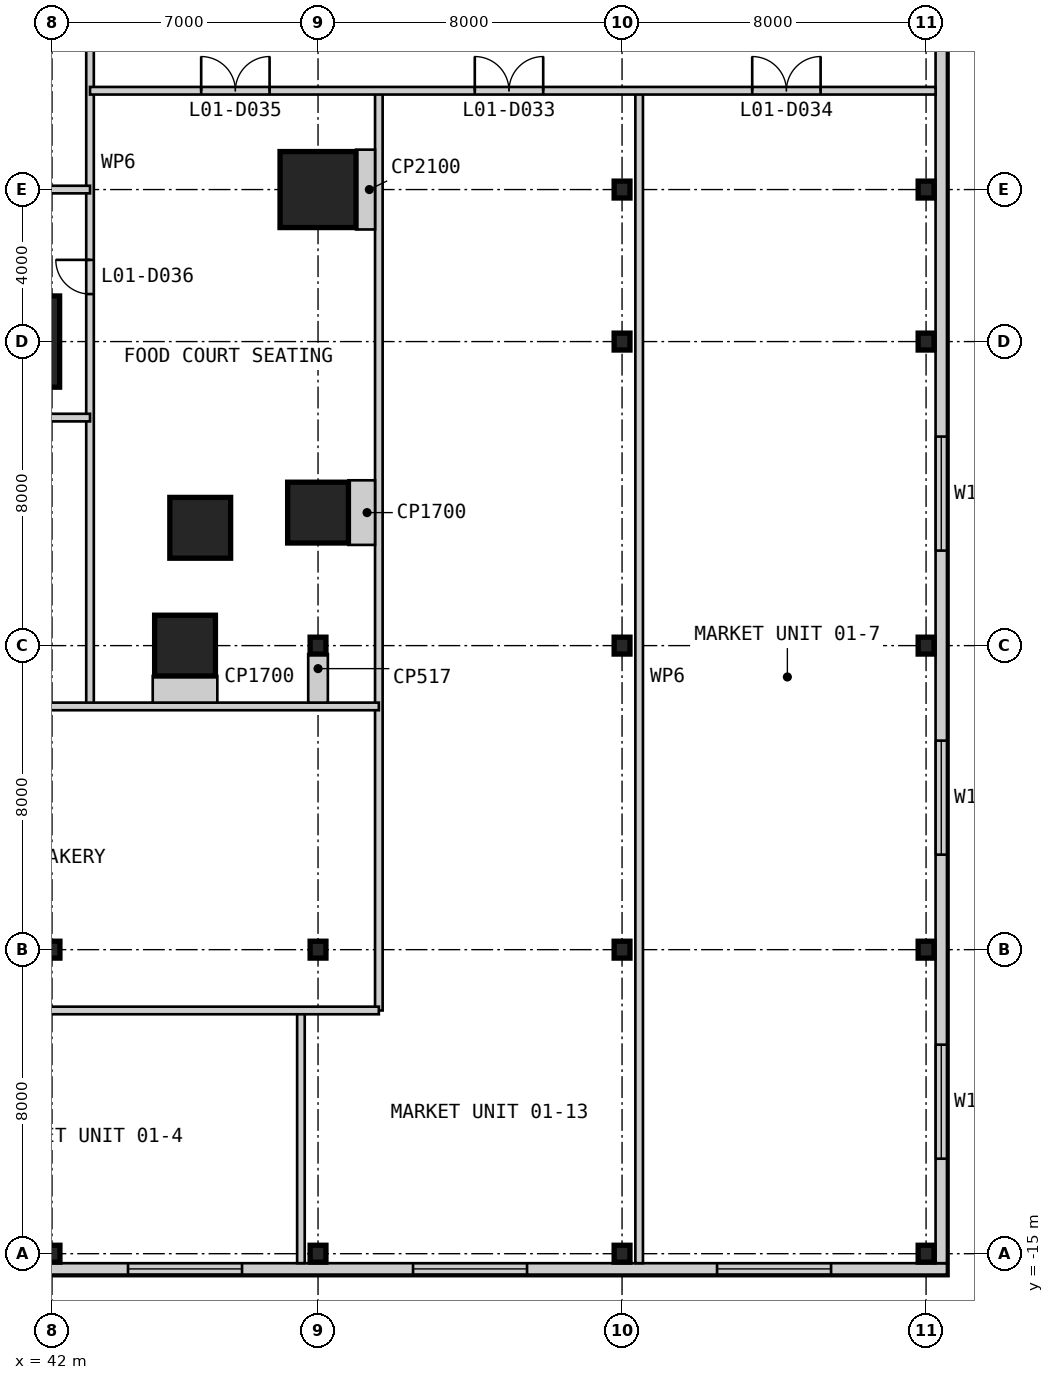
"""IFC4 building model, lengths in metres.
Left out: names, types, materials, properties, quantities, classifications, styles, units other than length and angle.
Written with IfcOpenShell. Run it as: python <this file> out.ifc"""

import sys

from ifc_helpers import new_model, si_unit, direction, frame, frame_2d, origin, origin_2d, place, context, subcontext, project, spatial, rectangle, i_section, extrude, element, fill, save


model = new_model("IFC4")
c1 = context("Model", 3, precision=1e-05, world=origin(), true_north=direction((0.0, 1.0)))
c2 = subcontext(c1, "Body", "Model", "MODEL_VIEW")
j1 = project(units=[si_unit("LENGTHUNIT", "METRE"), si_unit("PLANEANGLEUNIT", "RADIAN")], contexts=[c1])
p1 = place(None, origin())
s1 = spatial("IfcSite", under=j1, at=p1, CompositionType="ELEMENT")
p2 = place(p1, origin())
s2 = spatial("IfcBuilding", under=s1, at=p2, CompositionType="ELEMENT")
p3 = place(p2, frame((0.0, 0.0, 7.0)))
s3 = spatial("IfcBuildingStorey", under=s2, at=p3, CompositionType="ELEMENT", Elevation=7.0)
p4 = place(p3, frame((41.0, 9.0, 0.0), z_axis=(0.0, 0.0, 1.0), x_axis=(1.0, 0.0, 0.0)))
e1 = element("IfcColumn", 1, at=p4, inside=s3, PredefinedType="COLUMN", context=c2, shape_type="SweptSolid", body=[
    extrude(rectangle(XDim=2.4, YDim=2.4, at=origin_2d()), origin(), (0.0, 0.0, 1.0), 4.8),
])
for number, where, z_axis, x_axis in (
    (2, (45.5, 1.0, 0.0), (0.0, 0.0, 1.0), (1.0, 0.0, 0.0)),
    (3, (45.9, 4.1, 0.0), (0.0, 0.0, 1.0), (1.0, 0.0, 0.0)),
    (4, (49.0, 4.5, 0.0), (0.0, 0.0, 1.0), (1.0, 0.0, 0.0)),
):
    element("IfcColumn", number, at=place(p3, frame(where, z_axis=z_axis, x_axis=x_axis)), inside=s3, PredefinedType="COLUMN", context=c2, shape_type="SweptSolid", body=[
        extrude(rectangle(XDim=1.6, YDim=1.6, at=origin_2d()), origin(), (0.0, 0.0, 1.0), 4.8),
    ])
p5 = place(p3, frame((49.0, 13.0, 0.0), z_axis=(0.0, 0.0, 1.0), x_axis=(1.0, 0.0, 0.0)))
e5 = element("IfcColumn", 5, at=p5, inside=s3, PredefinedType="COLUMN", context=c2, shape_type="SweptSolid", body=[
    extrude(rectangle(XDim=2.0, YDim=2.0, at=origin_2d()), origin(), (0.0, 0.0, 1.0), 4.8),
])
for number, where, z_axis, x_axis in (
    (6, (42.0, -15.0, 0.0), (0.0, 0.0, 1.0), (1.0, 0.0, 0.0)),
    (7, (42.0, -7.0, 0.0), (0.0, 0.0, 1.0), (1.0, 0.0, 0.0)),
    (8, (49.0, -15.0, 0.0), (0.0, 0.0, 1.0), (1.0, 0.0, 0.0)),
    (9, (49.0, -7.0, 0.0), (0.0, 0.0, 1.0), (1.0, 0.0, 0.0)),
    (10, (49.0, 1.0, 0.0), (0.0, 0.0, 1.0), (1.0, 0.0, 0.0)),
    (11, (57.0, -15.0, 0.0), (0.0, 0.0, 1.0), (1.0, 0.0, 0.0)),
    (12, (57.0, -7.0, 0.0), (0.0, 0.0, 1.0), (1.0, 0.0, 0.0)),
    (13, (57.0, 1.0, 0.0), (0.0, 0.0, 1.0), (1.0, 0.0, 0.0)),
    (14, (57.0, 9.0, 0.0), (0.0, 0.0, 1.0), (1.0, 0.0, 0.0)),
    (15, (57.0, 13.0, 0.0), (0.0, 0.0, 1.0), (1.0, 0.0, 0.0)),
    (16, (65.0, -15.0, 0.0), (0.0, 0.0, 1.0), (1.0, 0.0, 0.0)),
    (17, (65.0, -7.0, 0.0), (0.0, 0.0, 1.0), (1.0, 0.0, 0.0)),
    (18, (65.0, 1.0, 0.0), (0.0, 0.0, 1.0), (1.0, 0.0, 0.0)),
    (19, (65.0, 9.0, 0.0), (0.0, 0.0, 1.0), (1.0, 0.0, 0.0)),
    (20, (65.0, 13.0, 0.0), (0.0, 0.0, 1.0), (1.0, 0.0, 0.0)),
):
    element("IfcColumn", number, at=place(p3, frame(where, z_axis=z_axis, x_axis=x_axis)), inside=s3, PredefinedType="COLUMN", context=c2, shape_type="SweptSolid", body=[
        extrude(i_section(OverallWidth=0.417, OverallDepth=0.445, WebThickness=0.039, FlangeThickness=0.063, at=origin_2d()), origin(), (0.0, 0.0, 1.0), 4.8),
    ])
p6 = place(p3, frame((-15.55, -15.4, 0.0), z_axis=(0.0, 0.0, 1.0), x_axis=(1.0, 0.0, 0.0)))
e21 = element("IfcWall", 21, at=p6, inside=s3, PredefinedType="SOLIDWALL", context=c2, shape_type="SweptSolid", body=[
    extrude(rectangle(XDim=81.1, YDim=0.3, at=frame_2d((40.55, 0.0))), origin(), (0.0, 0.0, 1.0), 4.5),
])
p7 = place(p6, frame((3.05, 0.0, 0.9)))
e22 = element("IfcOpeningElement", 22, at=p7, cuts=e21, PredefinedType="OPENING", context=c2, shape_type="SweptSolid", body=[
    extrude(rectangle(XDim=3.0, YDim=2.4, at=frame_2d((1.5, 1.2))), frame((0.0, 0.16, 0.0), z_axis=(0.0, -1.0, 0.0), x_axis=(1.0, 0.0, 0.0)), (0.0, 0.0, 1.0), 0.32),
])
p8 = place(p6, frame((11.05, 0.0, 0.9)))
e23 = element("IfcOpeningElement", 23, at=p8, cuts=e21, PredefinedType="OPENING", context=c2, shape_type="SweptSolid", body=[
    extrude(rectangle(XDim=3.0, YDim=2.4, at=frame_2d((1.5, 1.2))), frame((0.0, 0.16, 0.0), z_axis=(0.0, -1.0, 0.0), x_axis=(1.0, 0.0, 0.0)), (0.0, 0.0, 1.0), 0.32),
])
p9 = place(p6, frame((19.05, 0.0, 0.9)))
e24 = element("IfcOpeningElement", 24, at=p9, cuts=e21, PredefinedType="OPENING", context=c2, shape_type="SweptSolid", body=[
    extrude(rectangle(XDim=3.0, YDim=2.4, at=frame_2d((1.5, 1.2))), frame((0.0, 0.16, 0.0), z_axis=(0.0, -1.0, 0.0), x_axis=(1.0, 0.0, 0.0)), (0.0, 0.0, 1.0), 0.32),
])
p10 = place(p6, frame((33.05, 0.0, 0.9)))
e25 = element("IfcOpeningElement", 25, at=p10, cuts=e21, PredefinedType="OPENING", context=c2, shape_type="SweptSolid", body=[
    extrude(rectangle(XDim=3.0, YDim=2.4, at=frame_2d((1.5, 1.2))), frame((0.0, 0.16, 0.0), z_axis=(0.0, -1.0, 0.0), x_axis=(1.0, 0.0, 0.0)), (0.0, 0.0, 1.0), 0.32),
])
p11 = place(p6, frame((45.05, 0.0, 0.9)))
e26 = element("IfcOpeningElement", 26, at=p11, cuts=e21, PredefinedType="OPENING", context=c2, shape_type="SweptSolid", body=[
    extrude(rectangle(XDim=3.0, YDim=2.4, at=frame_2d((1.5, 1.2))), frame((0.0, 0.16, 0.0), z_axis=(0.0, -1.0, 0.0), x_axis=(1.0, 0.0, 0.0)), (0.0, 0.0, 1.0), 0.32),
])
p12 = place(p6, frame((53.55, 0.0, 0.9)))
e27 = element("IfcOpeningElement", 27, at=p12, cuts=e21, PredefinedType="OPENING", context=c2, shape_type="SweptSolid", body=[
    extrude(rectangle(XDim=3.0, YDim=2.4, at=frame_2d((1.5, 1.2))), frame((0.0, 0.16, 0.0), z_axis=(0.0, -1.0, 0.0), x_axis=(1.0, 0.0, 0.0)), (0.0, 0.0, 1.0), 0.32),
])
p13 = place(p6, frame((59.55, 0.0, 0.9)))
e28 = element("IfcOpeningElement", 28, at=p13, cuts=e21, PredefinedType="OPENING", context=c2, shape_type="SweptSolid", body=[
    extrude(rectangle(XDim=3.0, YDim=2.4, at=frame_2d((1.5, 1.2))), frame((0.0, 0.16, 0.0), z_axis=(0.0, -1.0, 0.0), x_axis=(1.0, 0.0, 0.0)), (0.0, 0.0, 1.0), 0.32),
])
p14 = place(p6, frame((67.05, 0.0, 0.9)))
e29 = element("IfcOpeningElement", 29, at=p14, cuts=e21, PredefinedType="OPENING", context=c2, shape_type="SweptSolid", body=[
    extrude(rectangle(XDim=3.0, YDim=2.4, at=frame_2d((1.5, 1.2))), frame((0.0, 0.16, 0.0), z_axis=(0.0, -1.0, 0.0), x_axis=(1.0, 0.0, 0.0)), (0.0, 0.0, 1.0), 0.32),
])
p15 = place(p6, frame((75.05, 0.0, 0.9)))
e30 = element("IfcOpeningElement", 30, at=p15, cuts=e21, PredefinedType="OPENING", context=c2, shape_type="SweptSolid", body=[
    extrude(rectangle(XDim=3.0, YDim=2.4, at=frame_2d((1.5, 1.2))), frame((0.0, 0.16, 0.0), z_axis=(0.0, -1.0, 0.0), x_axis=(1.0, 0.0, 0.0)), (0.0, 0.0, 1.0), 0.32),
])
p16 = place(p3, frame((65.4, -15.25, 0.0), z_axis=(0.0, 0.0, 1.0), x_axis=(0.0, 1.0, 0.0)))
e31 = element("IfcWall", 31, at=p16, inside=s3, PredefinedType="SOLIDWALL", context=c2, shape_type="SweptSolid", body=[
    extrude(rectangle(XDim=80.5, YDim=0.3, at=frame_2d((40.25, 0.0))), origin(), (0.0, 0.0, 1.0), 4.5),
])
p17 = place(p16, frame((2.75, 0.0, 0.9)))
e32 = element("IfcOpeningElement", 32, at=p17, cuts=e31, PredefinedType="OPENING", context=c2, shape_type="SweptSolid", body=[
    extrude(rectangle(XDim=3.0, YDim=2.4, at=frame_2d((1.5, 1.2))), frame((0.0, 0.16, 0.0), z_axis=(0.0, -1.0, 0.0), x_axis=(1.0, 0.0, 0.0)), (0.0, 0.0, 1.0), 0.32),
])
p18 = place(p16, frame((10.75, 0.0, 0.9)))
e33 = element("IfcOpeningElement", 33, at=p18, cuts=e31, PredefinedType="OPENING", context=c2, shape_type="SweptSolid", body=[
    extrude(rectangle(XDim=3.0, YDim=2.4, at=frame_2d((1.5, 1.2))), frame((0.0, 0.16, 0.0), z_axis=(0.0, -1.0, 0.0), x_axis=(1.0, 0.0, 0.0)), (0.0, 0.0, 1.0), 0.32),
])
p19 = place(p16, frame((18.75, 0.0, 0.9)))
e34 = element("IfcOpeningElement", 34, at=p19, cuts=e31, PredefinedType="OPENING", context=c2, shape_type="SweptSolid", body=[
    extrude(rectangle(XDim=3.0, YDim=2.4, at=frame_2d((1.5, 1.2))), frame((0.0, 0.16, 0.0), z_axis=(0.0, -1.0, 0.0), x_axis=(1.0, 0.0, 0.0)), (0.0, 0.0, 1.0), 0.32),
])
p20 = place(p16, frame((32.75, 0.0, 0.9)))
e35 = element("IfcOpeningElement", 35, at=p20, cuts=e31, PredefinedType="OPENING", context=c2, shape_type="SweptSolid", body=[
    extrude(rectangle(XDim=3.0, YDim=2.4, at=frame_2d((1.5, 1.2))), frame((0.0, 0.16, 0.0), z_axis=(0.0, -1.0, 0.0), x_axis=(1.0, 0.0, 0.0)), (0.0, 0.0, 1.0), 0.32),
])
p21 = place(p16, frame((44.75, 0.0, 0.9)))
e36 = element("IfcOpeningElement", 36, at=p21, cuts=e31, PredefinedType="OPENING", context=c2, shape_type="SweptSolid", body=[
    extrude(rectangle(XDim=3.0, YDim=2.4, at=frame_2d((1.5, 1.2))), frame((0.0, 0.16, 0.0), z_axis=(0.0, -1.0, 0.0), x_axis=(1.0, 0.0, 0.0)), (0.0, 0.0, 1.0), 0.32),
])
p22 = place(p16, frame((53.25, 0.0, 0.9)))
e37 = element("IfcOpeningElement", 37, at=p22, cuts=e31, PredefinedType="OPENING", context=c2, shape_type="SweptSolid", body=[
    extrude(rectangle(XDim=3.0, YDim=2.4, at=frame_2d((1.5, 1.2))), frame((0.0, 0.16, 0.0), z_axis=(0.0, -1.0, 0.0), x_axis=(1.0, 0.0, 0.0)), (0.0, 0.0, 1.0), 0.32),
])
p23 = place(p16, frame((59.25, 0.0, 0.9)))
e38 = element("IfcOpeningElement", 38, at=p23, cuts=e31, PredefinedType="OPENING", context=c2, shape_type="SweptSolid", body=[
    extrude(rectangle(XDim=3.0, YDim=2.4, at=frame_2d((1.5, 1.2))), frame((0.0, 0.16, 0.0), z_axis=(0.0, -1.0, 0.0), x_axis=(1.0, 0.0, 0.0)), (0.0, 0.0, 1.0), 0.32),
])
p24 = place(p16, frame((66.75, 0.0, 0.9)))
e39 = element("IfcOpeningElement", 39, at=p24, cuts=e31, PredefinedType="OPENING", context=c2, shape_type="SweptSolid", body=[
    extrude(rectangle(XDim=3.0, YDim=2.4, at=frame_2d((1.5, 1.2))), frame((0.0, 0.16, 0.0), z_axis=(0.0, -1.0, 0.0), x_axis=(1.0, 0.0, 0.0)), (0.0, 0.0, 1.0), 0.32),
])
p25 = place(p16, frame((74.75, 0.0, 0.9)))
e40 = element("IfcOpeningElement", 40, at=p25, cuts=e31, PredefinedType="OPENING", context=c2, shape_type="SweptSolid", body=[
    extrude(rectangle(XDim=3.0, YDim=2.4, at=frame_2d((1.5, 1.2))), frame((0.0, 0.16, 0.0), z_axis=(0.0, -1.0, 0.0), x_axis=(1.0, 0.0, 0.0)), (0.0, 0.0, 1.0), 0.32),
])
p26 = place(p3, frame((43.0, -0.6, 0.0), z_axis=(0.0, 0.0, 1.0), x_axis=(0.0, 1.0, 0.0)))
e41 = element("IfcWall", 41, at=p26, inside=s3, PredefinedType="PARTITIONING", context=c2, shape_type="SweptSolid", body=[
    extrude(rectangle(XDim=28.6, YDim=0.2, at=frame_2d((14.3, 0.0))), origin(), (0.0, 0.0, 1.0), 3.843),
])
p27 = place(p26, frame((10.85, 0.0, 0.0)))
e42 = element("IfcOpeningElement", 42, at=p27, cuts=e41, PredefinedType="OPENING", context=c2, shape_type="SweptSolid", body=[
    extrude(rectangle(XDim=0.9, YDim=2.2, at=frame_2d((0.45, 1.1))), frame((0.0, 0.11, 0.0), z_axis=(0.0, -1.0, 0.0), x_axis=(1.0, 0.0, 0.0)), (0.0, 0.0, 1.0), 0.22),
])
p28 = place(p3, frame((48.55, -15.25, 0.0), z_axis=(0.0, 0.0, 1.0), x_axis=(0.0, 1.0, 0.0)))
e43 = element("IfcWall", 43, at=p28, inside=s3, PredefinedType="PARTITIONING", context=c2, shape_type="SweptSolid", body=[
    extrude(rectangle(XDim=6.65, YDim=0.2, at=frame_2d((3.325, 0.0))), origin(), (0.0, 0.0, 1.0), 4.5),
])
p29 = place(p3, frame((50.6, -8.6, 0.0), z_axis=(0.0, 0.0, 1.0), x_axis=(0.0, 1.0, 0.0)))
e44 = element("IfcWall", 44, at=p29, inside=s3, PredefinedType="PARTITIONING", context=c2, shape_type="SweptSolid", body=[
    extrude(rectangle(XDim=24.2, YDim=0.2, at=frame_2d((12.1, 0.0))), origin(), (0.0, 0.0, 1.0), 4.5),
])
p30 = place(p3, frame((57.45, -15.25, 0.0), z_axis=(0.0, 0.0, 1.0), x_axis=(0.0, 1.0, 0.0)))
e45 = element("IfcWall", 45, at=p30, inside=s3, PredefinedType="PARTITIONING", context=c2, shape_type="SweptSolid", body=[
    extrude(rectangle(XDim=30.85, YDim=0.2, at=frame_2d((15.425, 0.0))), origin(), (0.0, 0.0, 1.0), 4.5),
])
for number, where, z_axis, x_axis in (
    (46, (34.4, -8.6, 0.0), (0.0, 0.0, 1.0), (1.0, 0.0, 0.0)),
    (47, (34.4, -0.6, 0.0), (0.0, 0.0, 1.0), (1.0, 0.0, 0.0)),
):
    element("IfcWall", number, at=place(p3, frame(where, z_axis=z_axis, x_axis=x_axis)), inside=s3, PredefinedType="PARTITIONING", context=c2, shape_type="SweptSolid", body=[
        extrude(rectangle(XDim=16.2, YDim=0.2, at=frame_2d((8.1, 0.0))), origin(), (0.0, 0.0, 1.0), 4.5),
    ])
p31 = place(p3, frame((34.4, 7.0, 0.0), z_axis=(0.0, 0.0, 1.0), x_axis=(1.0, 0.0, 0.0)))
e48 = element("IfcWall", 48, at=p31, inside=s3, PredefinedType="PARTITIONING", context=c2, shape_type="SweptSolid", body=[
    extrude(rectangle(XDim=8.6, YDim=0.2, at=frame_2d((4.3, 0.0))), origin(), (0.0, 0.0, 1.0), 4.5),
])
p32 = place(p3, frame((37.0, 13.0, 0.0), z_axis=(0.0, 0.0, 1.0), x_axis=(1.0, 0.0, 0.0)))
e49 = element("IfcWall", 49, at=p32, inside=s3, PredefinedType="PARTITIONING", context=c2, shape_type="SweptSolid", body=[
    extrude(rectangle(XDim=6.0, YDim=0.2, at=frame_2d((3.0, 0.0))), origin(), (0.0, 0.0, 1.0), 3.653),
])
p33 = place(p3, frame((43.0, 15.6, 0.0), z_axis=(0.0, 0.0, 1.0), x_axis=(1.0, 0.0, 0.0)))
e50 = element("IfcWall", 50, at=p33, inside=s3, PredefinedType="PARTITIONING", context=c2, shape_type="SweptSolid", body=[
    extrude(rectangle(XDim=22.25, YDim=0.2, at=frame_2d((11.125, 0.0))), origin(), (0.0, 0.0, 1.0), 4.5),
])
p34 = place(p33, frame((10.125, 0.0, 0.0)))
e51 = element("IfcOpeningElement", 51, at=p34, cuts=e50, PredefinedType="OPENING", context=c2, shape_type="SweptSolid", body=[
    extrude(rectangle(XDim=1.8, YDim=2.4, at=frame_2d((0.9, 1.2))), frame((0.0, 0.11, 0.0), z_axis=(0.0, -1.0, 0.0), x_axis=(1.0, 0.0, 0.0)), (0.0, 0.0, 1.0), 0.22),
])
p35 = place(p33, frame((17.425, 0.0, 0.0)))
e52 = element("IfcOpeningElement", 52, at=p35, cuts=e50, PredefinedType="OPENING", context=c2, shape_type="SweptSolid", body=[
    extrude(rectangle(XDim=1.8, YDim=2.4, at=frame_2d((0.9, 1.2))), frame((0.0, 0.11, 0.0), z_axis=(0.0, -1.0, 0.0), x_axis=(1.0, 0.0, 0.0)), (0.0, 0.0, 1.0), 0.22),
])
p36 = place(p33, frame((2.925, 0.0, 0.0)))
e53 = element("IfcOpeningElement", 53, at=p36, cuts=e50, PredefinedType="OPENING", context=c2, shape_type="SweptSolid", body=[
    extrude(rectangle(XDim=1.8, YDim=2.4, at=frame_2d((0.9, 1.2))), frame((0.0, 0.11, 0.0), z_axis=(0.0, -1.0, 0.0), x_axis=(1.0, 0.0, 0.0)), (0.0, 0.0, 1.0), 0.22),
])
for number, where, z_axis, x_axis in (
    (54, (45.5, -0.5, 0.0), (0.0, 0.0, 1.0), (0.0, 1.0, 0.0)),
    (55, (50.5, 4.5, 0.0), (0.0, 0.0, 1.0), (-1.0, 0.0, 0.0)),
):
    element("IfcWall", number, at=place(p3, frame(where, z_axis=z_axis, x_axis=x_axis)), inside=s3, PredefinedType="PARTITIONING", context=c2, shape_type="SweptSolid", body=[
        extrude(rectangle(XDim=0.7, YDim=1.7, at=frame_2d((0.35, 0.0))), origin(), (0.0, 0.0, 1.0), 4.5),
    ])
p37 = place(p3, frame((50.5, 13.0, 0.0), z_axis=(0.0, 0.0, 1.0), x_axis=(-1.0, 0.0, 0.0)))
e56 = element("IfcWall", 56, at=p37, inside=s3, PredefinedType="PARTITIONING", context=c2, shape_type="SweptSolid", body=[
    extrude(rectangle(XDim=0.5, YDim=2.1, at=frame_2d((0.25, 0.0))), origin(), (0.0, 0.0, 1.0), 4.5),
])
p38 = place(p3, frame((49.0, -0.5, 0.0), z_axis=(0.0, 0.0, 1.0), x_axis=(0.0, 1.0, 0.0)))
e57 = element("IfcWall", 57, at=p38, inside=s3, PredefinedType="PARTITIONING", context=c2, shape_type="SweptSolid", body=[
    extrude(rectangle(XDim=1.278, YDim=0.517, at=frame_2d((0.639, 0.0))), origin(), (0.0, 0.0, 1.0), 3.754),
])
p39 = place(p13, origin())
e58 = element("IfcWindow", 58, at=p39, inside=s3, PartitioningType="SINGLE_PANEL", PredefinedType="WINDOW", context=c2, shape_type="SweptSolid", body=[
    extrude(rectangle(XDim=3.0, YDim=2.4, at=frame_2d((1.5, 1.2))), frame((0.0, 0.03, 0.0), z_axis=(0.0, -1.0, 0.0), x_axis=(1.0, 0.0, 0.0)), (0.0, 0.0, 1.0), 0.06),
])
fill(e28, e58)
p40 = place(p14, origin())
e59 = element("IfcWindow", 59, at=p40, inside=s3, PartitioningType="SINGLE_PANEL", PredefinedType="WINDOW", context=c2, shape_type="SweptSolid", body=[
    extrude(rectangle(XDim=3.0, YDim=2.4, at=frame_2d((1.5, 1.2))), frame((0.0, 0.03, 0.0), z_axis=(0.0, -1.0, 0.0), x_axis=(1.0, 0.0, 0.0)), (0.0, 0.0, 1.0), 0.06),
])
fill(e29, e59)
p41 = place(p15, origin())
e60 = element("IfcWindow", 60, at=p41, inside=s3, PartitioningType="SINGLE_PANEL", PredefinedType="WINDOW", context=c2, shape_type="SweptSolid", body=[
    extrude(rectangle(XDim=3.0, YDim=2.4, at=frame_2d((1.5, 1.2))), frame((0.0, 0.03, 0.0), z_axis=(0.0, -1.0, 0.0), x_axis=(1.0, 0.0, 0.0)), (0.0, 0.0, 1.0), 0.06),
])
fill(e30, e60)
p42 = place(p17, origin())
e61 = element("IfcWindow", 61, at=p42, inside=s3, PartitioningType="SINGLE_PANEL", PredefinedType="WINDOW", context=c2, shape_type="SweptSolid", body=[
    extrude(rectangle(XDim=3.0, YDim=2.4, at=frame_2d((1.5, 1.2))), frame((0.0, 0.03, 0.0), z_axis=(0.0, -1.0, 0.0), x_axis=(1.0, 0.0, 0.0)), (0.0, 0.0, 1.0), 0.06),
])
fill(e32, e61)
p43 = place(p18, origin())
e62 = element("IfcWindow", 62, at=p43, inside=s3, PartitioningType="SINGLE_PANEL", PredefinedType="WINDOW", context=c2, shape_type="SweptSolid", body=[
    extrude(rectangle(XDim=3.0, YDim=2.4, at=frame_2d((1.5, 1.2))), frame((0.0, 0.03, 0.0), z_axis=(0.0, -1.0, 0.0), x_axis=(1.0, 0.0, 0.0)), (0.0, 0.0, 1.0), 0.06),
])
fill(e33, e62)
p44 = place(p19, origin())
e63 = element("IfcWindow", 63, at=p44, inside=s3, PartitioningType="SINGLE_PANEL", PredefinedType="WINDOW", context=c2, shape_type="SweptSolid", body=[
    extrude(rectangle(XDim=3.0, YDim=2.4, at=frame_2d((1.5, 1.2))), frame((0.0, 0.03, 0.0), z_axis=(0.0, -1.0, 0.0), x_axis=(1.0, 0.0, 0.0)), (0.0, 0.0, 1.0), 0.06),
])
fill(e34, e63)
p45 = place(p34, origin())
e64 = element("IfcDoor", 64, at=p45, inside=s3, OperationType="DOUBLE_DOOR_SINGLE_SWING", PredefinedType="DOOR", context=c2, shape_type="SweptSolid", body=[
    extrude(rectangle(XDim=1.8, YDim=2.4, at=frame_2d((0.9, 1.2))), frame((0.0, 0.025, 0.0), z_axis=(0.0, -1.0, 0.0), x_axis=(1.0, 0.0, 0.0)), (0.0, 0.0, 1.0), 0.05),
])
fill(e51, e64)
p46 = place(p35, origin())
e65 = element("IfcDoor", 65, at=p46, inside=s3, OperationType="DOUBLE_DOOR_SINGLE_SWING", PredefinedType="DOOR", context=c2, shape_type="SweptSolid", body=[
    extrude(rectangle(XDim=1.8, YDim=2.4, at=frame_2d((0.9, 1.2))), frame((0.0, 0.025, 0.0), z_axis=(0.0, -1.0, 0.0), x_axis=(1.0, 0.0, 0.0)), (0.0, 0.0, 1.0), 0.05),
])
fill(e52, e65)
p47 = place(p36, origin())
e66 = element("IfcDoor", 66, at=p47, inside=s3, OperationType="DOUBLE_DOOR_SINGLE_SWING", PredefinedType="DOOR", context=c2, shape_type="SweptSolid", body=[
    extrude(rectangle(XDim=1.8, YDim=2.4, at=frame_2d((0.9, 1.2))), frame((0.0, 0.025, 0.0), z_axis=(0.0, -1.0, 0.0), x_axis=(1.0, 0.0, 0.0)), (0.0, 0.0, 1.0), 0.05),
])
fill(e53, e66)
p48 = place(p27, origin())
e67 = element("IfcDoor", 67, at=p48, inside=s3, OperationType="SINGLE_SWING_RIGHT", PredefinedType="DOOR", context=c2, shape_type="SweptSolid", body=[
    extrude(rectangle(XDim=0.9, YDim=2.2, at=frame_2d((0.45, 1.1))), frame((0.0, 0.025, 0.0), z_axis=(0.0, -1.0, 0.0), x_axis=(1.0, 0.0, 0.0)), (0.0, 0.0, 1.0), 0.05),
])
fill(e42, e67)
save(model, sys.argv[1])
